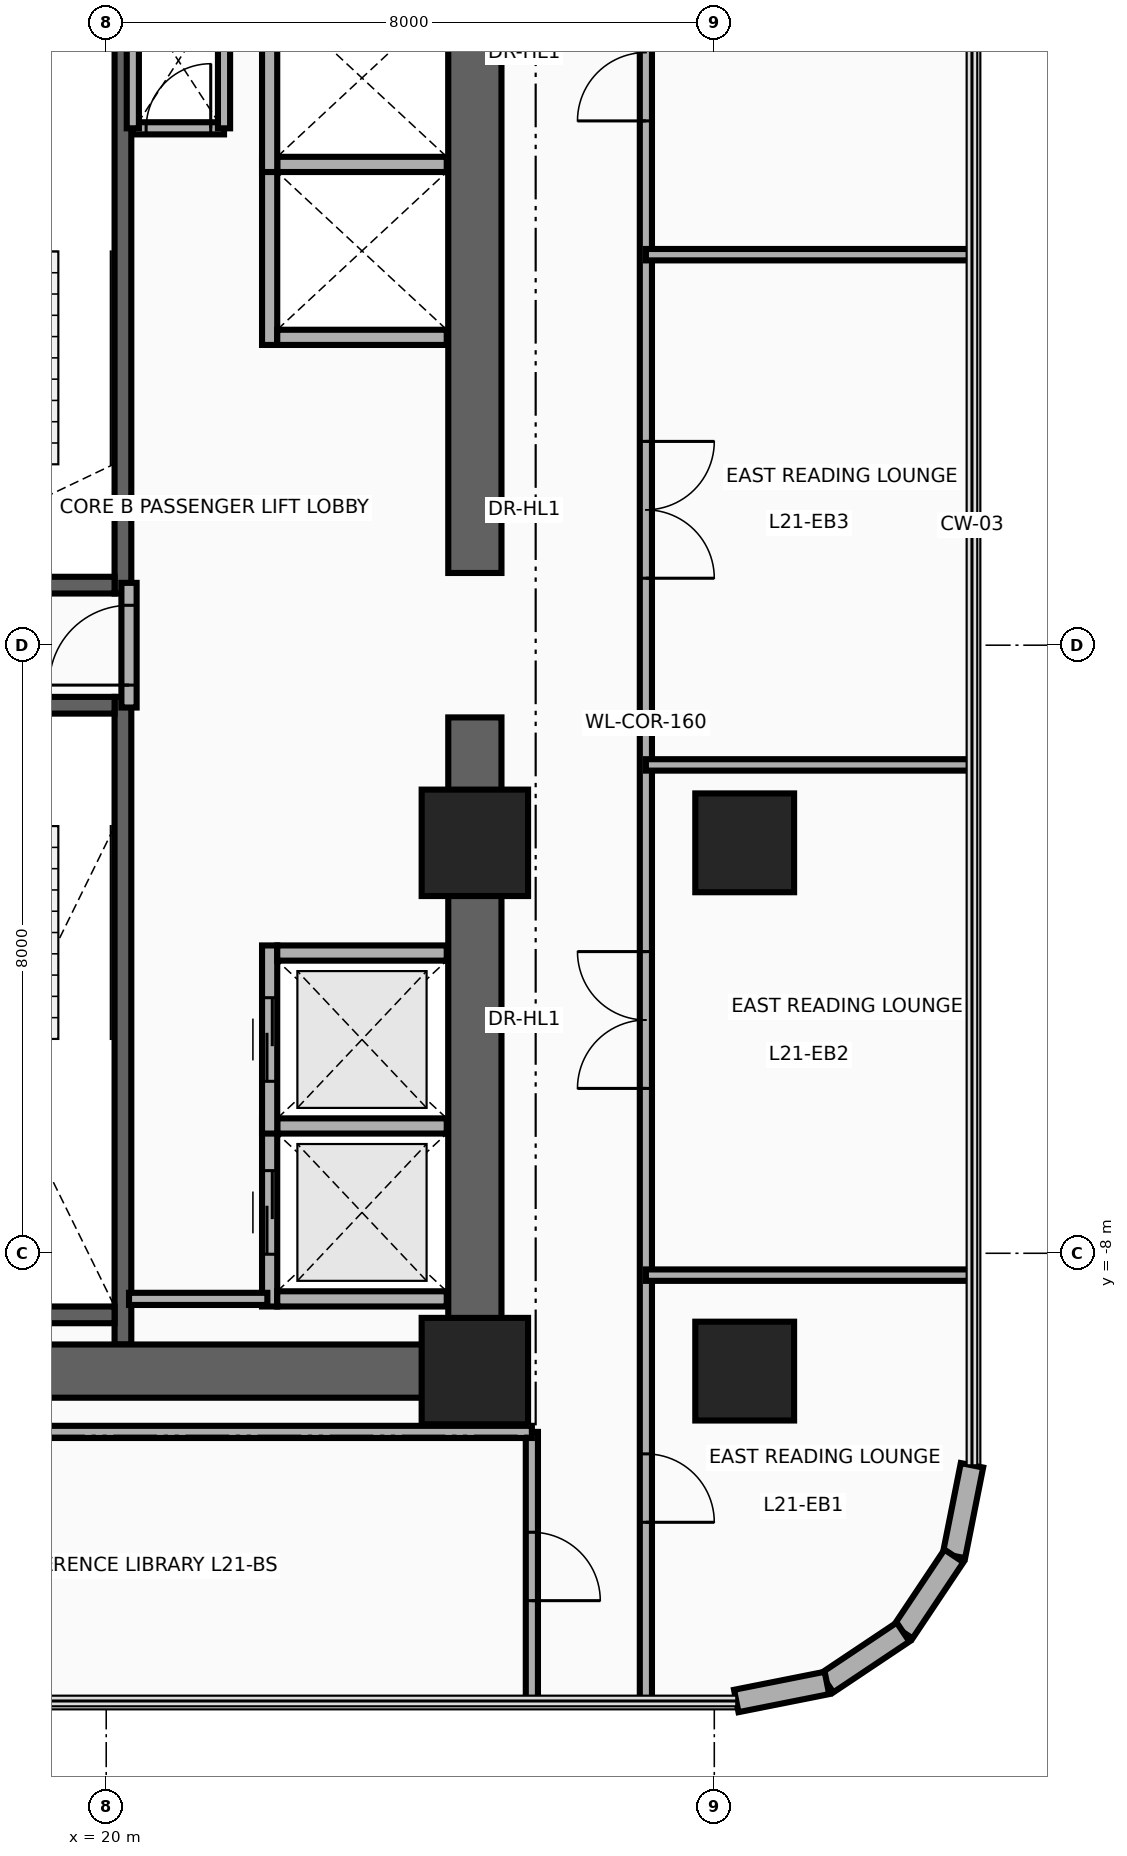
"""IFC4 building model, lengths in metres.
Left out: names, types, materials, properties, quantities, classifications, styles, units other than length and angle.
Written with IfcOpenShell. Run it as: python <this file> out.ifc"""

import sys

from ifc_helpers import new_model, si_unit, direction, frame, frame_2d, origin, origin_2d, place, context, subcontext, project, spatial, rectangle, circle, extrude, source, transform, mapped, element, fill, save


model = new_model("IFC4")
c1 = context("Model", 3, precision=1e-05, world=origin(), true_north=direction((0.0, 1.0)))
c2 = subcontext(c1, "Body", "Model", "MODEL_VIEW")
j1 = project(units=[si_unit("LENGTHUNIT", "METRE"), si_unit("PLANEANGLEUNIT", "RADIAN")], contexts=[c1])
p1 = place(None, origin())
s1 = spatial("IfcSite", under=j1, at=p1, CompositionType="ELEMENT")
p2 = place(p1, origin())
s2 = spatial("IfcBuilding", under=s1, at=p2, CompositionType="ELEMENT")
p3 = place(p2, frame((0.0, 0.0, 85.2)))
s3 = spatial("IfcBuildingStorey", under=s2, at=p3, CompositionType="ELEMENT", Elevation=85.2)
p4 = place(p3, frame((20.22, 0.68, 0.0), z_axis=(0.0, 0.0, 1.0), x_axis=(0.0, 1.0, 0.0)))
e1 = element("IfcWall", 1, at=p4, inside=s3, PredefinedType="SHEAR", context=c2, shape_type="SweptSolid", body=[
    extrude(rectangle(XDim=8.52, YDim=0.22, at=frame_2d((4.26, 0.0))), origin(), (0.0, 0.0, 1.0), 3.46),
])
p5 = place(p3, frame((17.0, 0.79, 0.0), z_axis=(0.0, 0.0, 1.0), x_axis=(1.0, 0.0, 0.0)))
e2 = element("IfcWall", 2, at=p5, inside=s3, PredefinedType="SHEAR", context=c2, shape_type="SweptSolid", body=[
    extrude(rectangle(XDim=3.11, YDim=0.22, at=frame_2d((1.555, 0.0))), origin(), (0.0, 0.0, 1.0), 3.46),
])
p6 = place(p5, frame((0.95, 0.0, 0.0)))
e3 = element("IfcOpeningElement", 3, at=p6, cuts=e2, PredefinedType="OPENING", context=c2, shape_type="SweptSolid", body=[
    extrude(rectangle(XDim=1.1, YDim=2.15, at=frame_2d((0.55, 1.075))), frame((0.0, 0.125, 0.0), z_axis=(0.0, -1.0, 0.0), x_axis=(1.0, 0.0, 0.0)), (0.0, 0.0, 1.0), 0.25),
])
p7 = place(p3, frame((20.22, -9.2, 0.0), z_axis=(0.0, 0.0, 1.0), x_axis=(0.0, 1.0, 0.0)))
e4 = element("IfcWall", 4, at=p7, inside=s3, PredefinedType="SHEAR", context=c2, shape_type="SweptSolid", body=[
    extrude(rectangle(XDim=8.52, YDim=0.22, at=frame_2d((4.26, 0.0))), origin(), (0.0, 0.0, 1.0), 3.46),
])
p8 = place(p3, frame((17.0, -8.81, 0.0), z_axis=(0.0, 0.0, 1.0), x_axis=(1.0, 0.0, 0.0)))
e5 = element("IfcWall", 5, at=p8, inside=s3, PredefinedType="SHEAR", context=c2, shape_type="SweptSolid", body=[
    extrude(rectangle(XDim=3.11, YDim=0.22, at=frame_2d((1.555, 0.0))), origin(), (0.0, 0.0, 1.0), 3.46),
])
p9 = place(p3, frame((17.0, -0.79, 0.0), z_axis=(0.0, 0.0, 1.0), x_axis=(1.0, 0.0, 0.0)))
e6 = element("IfcWall", 6, at=p9, inside=s3, PredefinedType="SHEAR", context=c2, shape_type="SweptSolid", body=[
    extrude(rectangle(XDim=3.11, YDim=0.22, at=frame_2d((1.555, 0.0))), origin(), (0.0, 0.0, 1.0), 3.46),
])
p10 = place(p9, frame((0.95, 0.0, 0.0)))
e7 = element("IfcOpeningElement", 7, at=p10, cuts=e6, PredefinedType="OPENING", context=c2, shape_type="SweptSolid", body=[
    extrude(rectangle(XDim=1.1, YDim=2.15, at=frame_2d((0.55, 1.075))), frame((0.0, 0.125, 0.0), z_axis=(0.0, -1.0, 0.0), x_axis=(1.0, 0.0, 0.0)), (0.0, 0.0, 1.0), 0.25),
])
for number, where, z_axis, x_axis in (
    (8, (24.85, -9.9, 0.0), (0.0, 0.0, 1.0), (0.0, 1.0, 0.0)),
    (9, (24.85, 0.95, 0.0), (0.0, 0.0, 1.0), (0.0, 1.0, 0.0)),
):
    element("IfcWall", number, at=place(p3, frame(where, z_axis=z_axis, x_axis=x_axis)), inside=s3, PredefinedType="SHEAR", context=c2, shape_type="SweptSolid", body=[
        extrude(rectangle(XDim=8.95, YDim=0.7, at=frame_2d((4.475, 0.0))), origin(), (0.0, 0.0, 1.0), 3.46),
    ])
p11 = place(p3, frame((15.85, -9.55, 0.0), z_axis=(0.0, 0.0, 1.0), x_axis=(1.0, 0.0, 0.0)))
e10 = element("IfcWall", 10, at=p11, inside=s3, PredefinedType="SHEAR", context=c2, shape_type="SweptSolid", body=[
    extrude(rectangle(XDim=9.0, YDim=0.7, at=frame_2d((4.5, 0.0))), origin(), (0.0, 0.0, 1.0), 3.46),
])
m1 = source(origin(), c2, "Body", "SweptSolid", [
    extrude(rectangle(XDim=1.4, YDim=1.4, at=origin_2d()), origin(), (0.0, 0.0, 1.0), 3.7),
])
p12 = place(p3, frame((24.85, -9.55, 0.0), z_axis=(0.0, 0.0, 1.0), x_axis=(1.0, 0.0, 0.0)))
e11 = element("IfcColumn", 11, at=p12, inside=s3, PredefinedType="COLUMN", context=c2, shape_type="MappedRepresentation", body=[
    mapped(m1, transform((0.0, 0.0, 0.0), x_axis=(1.0, 0.0, 0.0), y_axis=(0.0, 1.0, 0.0), z_axis=(0.0, 0.0, 1.0), scale=1.0)),
])
m2 = source(origin(), c2, "Body", "SweptSolid", [
    extrude(circle(Radius=0.65, at=origin_2d()), origin(), (0.0, 0.0, 1.0), 3.7),
])
p13 = place(p3, frame((28.4, -9.55, 0.0), z_axis=(0.0, 0.0, 1.0), x_axis=(1.0, 0.0, 0.0)))
e12 = element("IfcColumn", 12, at=p13, inside=s3, PredefinedType="COLUMN", context=c2, shape_type="MappedRepresentation", body=[
    mapped(m2, transform((0.0, 0.0, 0.0), x_axis=(1.0, 0.0, 0.0), y_axis=(0.0, 1.0, 0.0), z_axis=(0.0, 0.0, 1.0), scale=1.0)),
])
p14 = place(p3, frame((24.85, -2.6, 0.0), z_axis=(0.0, 0.0, 1.0), x_axis=(1.0, 0.0, 0.0)))
e13 = element("IfcColumn", 13, at=p14, inside=s3, PredefinedType="COLUMN", context=c2, shape_type="MappedRepresentation", body=[
    mapped(m1, transform((0.0, 0.0, 0.0), x_axis=(1.0, 0.0, 0.0), y_axis=(0.0, 1.0, 0.0), z_axis=(0.0, 0.0, 1.0), scale=1.0)),
])
p15 = place(p3, frame((28.4, -2.6, 0.0), z_axis=(0.0, 0.0, 1.0), x_axis=(1.0, 0.0, 0.0)))
e14 = element("IfcColumn", 14, at=p15, inside=s3, PredefinedType="COLUMN", context=c2, shape_type="MappedRepresentation", body=[
    mapped(m2, transform((0.0, 0.0, 0.0), x_axis=(1.0, 0.0, 0.0), y_axis=(0.0, 1.0, 0.0), z_axis=(0.0, 0.0, 1.0), scale=1.0)),
])
p16 = place(p3, frame((31.39, -10.789, 0.0), z_axis=(0.0, 0.0, 1.0), x_axis=(-0.194996050505, -0.980804027463, 0.0)))
e15 = element("IfcWall", 15, at=p16, inside=s3, PredefinedType="SOLIDWALL", context=c2, shape_type="SweptSolid", body=[
    extrude(rectangle(XDim=1.216, YDim=0.3, at=frame_2d((0.608, 0.0))), origin(), (0.0, 0.0, 1.0), 3.46),
])
for number, where, z_axis, x_axis in (
    (16, (31.153, -11.982, 0.0), (0.0, 0.0, 1.0), (-0.556, -0.831, 0.0)),
    (17, (30.483, -12.983, 0.0), (0.0, 0.0, 1.0), (-0.831, -0.556, 0.0)),
):
    element("IfcWall", number, at=place(p3, frame(where, z_axis=z_axis, x_axis=x_axis)), inside=s3, PredefinedType="SOLIDWALL", context=c2, shape_type="SweptSolid", body=[
        extrude(rectangle(XDim=1.205, YDim=0.3, at=frame_2d((0.603, 0.0))), origin(), (0.0, 0.0, 1.0), 3.46),
    ])
p17 = place(p3, frame((29.482, -13.653, 0.0), z_axis=(0.0, 0.0, 1.0), x_axis=(-0.980804027463, -0.194996050505, 0.0)))
e18 = element("IfcWall", 18, at=p17, inside=s3, PredefinedType="SOLIDWALL", context=c2, shape_type="SweptSolid", body=[
    extrude(rectangle(XDim=1.216, YDim=0.3, at=frame_2d((0.608, 0.0))), origin(), (0.0, 0.0, 1.0), 3.46),
])
p18 = place(p3, frame((22.15, -8.7, 0.0), z_axis=(0.0, 0.0, 1.0), x_axis=(0.0, 1.0, 0.0)))
e19 = element("IfcWall", 19, at=p18, inside=s3, PredefinedType="MOVABLE", context=c2, shape_type="SweptSolid", body=[
    extrude(rectangle(XDim=2.475, YDim=0.2, at=frame_2d((1.237, 0.0))), origin(), (0.0, 0.0, 1.0), 3.46),
])
p19 = place(p18, frame((0.688, 0.0, 0.0)))
e20 = element("IfcOpeningElement", 20, at=p19, cuts=e19, PredefinedType="OPENING", context=c2, shape_type="SweptSolid", body=[
    extrude(rectangle(XDim=1.1, YDim=2.1, at=frame_2d((0.55, 1.05))), frame((0.0, 0.115, 0.0), z_axis=(0.0, -1.0, 0.0), x_axis=(1.0, 0.0, 0.0)), (0.0, 0.0, 1.0), 0.23),
])
for number, where, z_axis, x_axis in (
    (21, (22.25, -8.6, 0.0), (0.0, 0.0, 1.0), (1.0, 0.0, 0.0)),
    (22, (22.25, -6.325, 0.0), (0.0, 0.0, 1.0), (1.0, 0.0, 0.0)),
):
    element("IfcWall", number, at=place(p3, frame(where, z_axis=z_axis, x_axis=x_axis)), inside=s3, PredefinedType="MOVABLE", context=c2, shape_type="SweptSolid", body=[
        extrude(rectangle(XDim=2.23, YDim=0.2, at=frame_2d((1.115, 0.0))), origin(), (0.0, 0.0, 1.0), 3.46),
    ])
p20 = place(p3, frame((22.15, -6.425, 0.0), z_axis=(0.0, 0.0, 1.0), x_axis=(0.0, 1.0, 0.0)))
e23 = element("IfcWall", 23, at=p20, inside=s3, PredefinedType="MOVABLE", context=c2, shape_type="SweptSolid", body=[
    extrude(rectangle(XDim=2.475, YDim=0.2, at=frame_2d((1.238, 0.0))), origin(), (0.0, 0.0, 1.0), 3.46),
])
p21 = place(p20, frame((0.688, 0.0, 0.0)))
e24 = element("IfcOpeningElement", 24, at=p21, cuts=e23, PredefinedType="OPENING", context=c2, shape_type="SweptSolid", body=[
    extrude(rectangle(XDim=1.1, YDim=2.1, at=frame_2d((0.55, 1.05))), frame((0.0, 0.115, 0.0), z_axis=(0.0, -1.0, 0.0), x_axis=(1.0, 0.0, 0.0)), (0.0, 0.0, 1.0), 0.23),
])
p22 = place(p3, frame((22.25, -4.05, 0.0), z_axis=(0.0, 0.0, 1.0), x_axis=(1.0, 0.0, 0.0)))
e25 = element("IfcWall", 25, at=p22, inside=s3, PredefinedType="MOVABLE", context=c2, shape_type="SweptSolid", body=[
    extrude(rectangle(XDim=2.23, YDim=0.2, at=frame_2d((1.115, 0.0))), origin(), (0.0, 0.0, 1.0), 3.46),
])
p23 = place(p3, frame((22.15, 3.95, 0.0), z_axis=(0.0, 0.0, 1.0), x_axis=(0.0, 1.0, 0.0)))
e26 = element("IfcWall", 26, at=p23, inside=s3, PredefinedType="MOVABLE", context=c2, shape_type="SweptSolid", body=[
    extrude(rectangle(XDim=2.475, YDim=0.2, at=frame_2d((1.238, 0.0))), origin(), (0.0, 0.0, 1.0), 3.46),
])
for number, where, z_axis, x_axis in (
    (27, (22.25, 4.05, 0.0), (0.0, 0.0, 1.0), (1.0, 0.0, 0.0)),
    (28, (22.25, 6.325, 0.0), (0.0, 0.0, 1.0), (1.0, 0.0, 0.0)),
):
    element("IfcWall", number, at=place(p3, frame(where, z_axis=z_axis, x_axis=x_axis)), inside=s3, PredefinedType="MOVABLE", context=c2, shape_type="SweptSolid", body=[
        extrude(rectangle(XDim=2.23, YDim=0.2, at=frame_2d((1.115, 0.0))), origin(), (0.0, 0.0, 1.0), 2.245),
    ])
p24 = place(p3, frame((22.15, 6.225, 0.0), z_axis=(0.0, 0.0, 1.0), x_axis=(0.0, 1.0, 0.0)))
e29 = element("IfcWall", 29, at=p24, inside=s3, PredefinedType="MOVABLE", context=c2, shape_type="SweptSolid", body=[
    extrude(rectangle(XDim=2.475, YDim=0.2, at=frame_2d((1.237, 0.0))), origin(), (0.0, 0.0, 1.0), 3.46),
])
p25 = place(p3, frame((20.3, -0.82, 0.0), z_axis=(0.0, 0.0, 1.0), x_axis=(0.0, 1.0, 0.0)))
e30 = element("IfcWall", 30, at=p25, inside=s3, PredefinedType="PARTITIONING", context=c2, shape_type="SweptSolid", body=[
    extrude(rectangle(XDim=1.64, YDim=0.2, at=frame_2d((0.82, 0.0))), origin(), (0.0, 0.0, 1.0), 3.46),
])
p26 = place(p25, frame((0.295, 0.0, 0.0)))
e31 = element("IfcOpeningElement", 31, at=p26, cuts=e30, PredefinedType="OPENING", context=c2, shape_type="SweptSolid", body=[
    extrude(rectangle(XDim=1.05, YDim=2.15, at=frame_2d((0.525, 1.075))), frame((0.0, 0.115, 0.0), z_axis=(0.0, -1.0, 0.0), x_axis=(1.0, 0.0, 0.0)), (0.0, 0.0, 1.0), 0.23),
])
p27 = place(p3, frame((20.35, 6.8, 0.0), z_axis=(0.0, 0.0, 1.0), x_axis=(1.0, 0.0, 0.0)))
e32 = element("IfcWall", 32, at=p27, inside=s3, PredefinedType="PARTITIONING", context=c2, shape_type="SweptSolid", body=[
    extrude(rectangle(XDim=1.2, YDim=0.16, at=frame_2d((0.6, 0.0))), origin(), (0.0, 0.0, 1.0), 3.46),
])
p28 = place(p27, frame((0.175, 0.0, 0.0)))
e33 = element("IfcOpeningElement", 33, at=p28, cuts=e32, PredefinedType="OPENING", context=c2, shape_type="SweptSolid", body=[
    extrude(rectangle(XDim=0.85, YDim=2.05, at=frame_2d((0.425, 1.025))), frame((0.0, 0.095, 0.0), z_axis=(0.0, -1.0, 0.0), x_axis=(1.0, 0.0, 0.0)), (0.0, 0.0, 1.0), 0.19),
])
for number, where, z_axis, x_axis in (
    (34, (21.55, 6.8, 0.0), (0.0, 0.0, 1.0), (0.0, 1.0, 0.0)),
    (35, (20.35, 6.8, 0.0), (0.0, 0.0, 1.0), (0.0, 1.0, 0.0)),
):
    element("IfcWall", number, at=place(p3, frame(where, z_axis=z_axis, x_axis=x_axis)), inside=s3, PredefinedType="PARTITIONING", context=c2, shape_type="SweptSolid", body=[
        extrude(rectangle(XDim=1.8, YDim=0.16, at=frame_2d((0.9, 0.0))), origin(), (0.0, 0.0, 1.0), 3.46),
    ])
p29 = place(p3, frame((20.3, -8.6, 0.0), z_axis=(0.0, 0.0, 1.0), x_axis=(1.0, 0.0, 0.0)))
e36 = element("IfcWall", 36, at=p29, inside=s3, PredefinedType="PARTITIONING", context=c2, shape_type="SweptSolid", body=[
    extrude(rectangle(XDim=1.82, YDim=0.16, at=frame_2d((0.91, 0.0))), origin(), (0.0, 0.0, 1.0), 3.46),
])
p30 = place(p3, frame((25.6, -13.89, 0.0), z_axis=(0.0, 0.0, 1.0), x_axis=(0.0, 1.0, 0.0)))
e37 = element("IfcWall", 37, at=p30, inside=s3, PredefinedType="PARTITIONING", context=c2, shape_type="SweptSolid", body=[
    extrude(rectangle(XDim=3.54, YDim=0.16, at=frame_2d((1.77, 0.0))), origin(), (0.0, 0.0, 1.0), 3.46),
])
p31 = place(p30, frame((1.32, 0.0, 0.0)))
e38 = element("IfcOpeningElement", 38, at=p31, cuts=e37, PredefinedType="OPENING", context=c2, shape_type="SweptSolid", body=[
    extrude(rectangle(XDim=0.9, YDim=2.1, at=frame_2d((0.45, 1.05))), frame((0.0, 0.095, 0.0), z_axis=(0.0, -1.0, 0.0), x_axis=(1.0, 0.0, 0.0)), (0.0, 0.0, 1.0), 0.19),
])
p32 = place(p3, frame((13.41, -10.35, 0.0), z_axis=(0.0, 0.0, 1.0), x_axis=(1.0, 0.0, 0.0)))
e39 = element("IfcWall", 39, at=p32, inside=s3, PredefinedType="PARTITIONING", context=c2, shape_type="SweptSolid", body=[
    extrude(rectangle(XDim=12.19, YDim=0.16, at=frame_2d((6.095, 0.0))), origin(), (0.0, 0.0, 1.0), 3.46),
])
p33 = place(p3, frame((27.1, -13.89, 0.0), z_axis=(0.0, 0.0, 1.0), x_axis=(0.0, 1.0, 0.0)))
e40 = element("IfcWall", 40, at=p33, inside=s3, PredefinedType="PARTITIONING", context=c2, shape_type="SweptSolid", body=[
    extrude(rectangle(XDim=25.74, YDim=0.16, at=frame_2d((12.87, 0.0))), origin(), (0.0, 0.0, 1.0), 2.583),
])
p34 = place(p33, frame((2.351, 0.0, 0.0)))
e41 = element("IfcOpeningElement", 41, at=p34, cuts=e40, PredefinedType="OPENING", context=c2, shape_type="SweptSolid", body=[
    extrude(rectangle(XDim=0.9, YDim=2.1, at=frame_2d((0.45, 1.05))), frame((0.0, 0.095, 0.0), z_axis=(0.0, -1.0, 0.0), x_axis=(1.0, 0.0, 0.0)), (0.0, 0.0, 1.0), 0.19),
])
p35 = place(p33, frame((8.059, 0.0, 0.0)))
e42 = element("IfcOpeningElement", 42, at=p35, cuts=e40, PredefinedType="OPENING", context=c2, shape_type="SweptSolid", body=[
    extrude(rectangle(XDim=1.8, YDim=2.15, at=frame_2d((0.9, 1.075))), frame((0.0, 0.095, 0.0), z_axis=(0.0, -1.0, 0.0), x_axis=(1.0, 0.0, 0.0)), (0.0, 0.0, 1.0), 0.19),
])
p36 = place(p33, frame((14.771, 0.0, 0.0)))
e43 = element("IfcOpeningElement", 43, at=p36, cuts=e40, PredefinedType="OPENING", context=c2, shape_type="SweptSolid", body=[
    extrude(rectangle(XDim=1.8, YDim=2.15, at=frame_2d((0.9, 1.075))), frame((0.0, 0.095, 0.0), z_axis=(0.0, -1.0, 0.0), x_axis=(1.0, 0.0, 0.0)), (0.0, 0.0, 1.0), 0.19),
])
p37 = place(p33, frame((20.788, 0.0, 0.0)))
e44 = element("IfcOpeningElement", 44, at=p37, cuts=e40, PredefinedType="OPENING", context=c2, shape_type="SweptSolid", body=[
    extrude(rectangle(XDim=1.8, YDim=2.15, at=frame_2d((0.9, 1.075))), frame((0.0, 0.095, 0.0), z_axis=(0.0, -1.0, 0.0), x_axis=(1.0, 0.0, 0.0)), (0.0, 0.0, 1.0), 0.19),
])
for number, where, z_axis, x_axis in (
    (45, (27.1, -8.288, 0.0), (0.0, 0.0, 1.0), (1.0, 0.0, 0.0)),
    (46, (27.1, -1.575, 0.0), (0.0, 0.0, 1.0), (1.0, 0.0, 0.0)),
    (47, (27.1, 5.137, 0.0), (0.0, 0.0, 1.0), (1.0, 0.0, 0.0)),
):
    element("IfcWall", number, at=place(p3, frame(where, z_axis=z_axis, x_axis=x_axis)), inside=s3, PredefinedType="PARTITIONING", context=c2, shape_type="SweptSolid", body=[
        extrude(rectangle(XDim=4.29, YDim=0.15, at=frame_2d((2.145, 0.0))), origin(), (0.0, 0.0, 1.0), 2.896),
    ])
p38 = place(p19, origin())
e48 = element("IfcDoor", 48, at=p38, inside=s3, OperationType="DOUBLE_DOOR_SLIDING", PredefinedType="DOOR", context=c2, shape_type="SweptSolid", body=[
    extrude(rectangle(XDim=1.1, YDim=2.1, at=frame_2d((0.55, 1.05))), frame((0.0, 0.025, 0.0), z_axis=(0.0, -1.0, 0.0), x_axis=(1.0, 0.0, 0.0)), (0.0, 0.0, 1.0), 0.05),
])
fill(e20, e48)
p39 = place(p21, origin())
e49 = element("IfcDoor", 49, at=p39, inside=s3, OperationType="DOUBLE_DOOR_SLIDING", PredefinedType="DOOR", context=c2, shape_type="SweptSolid", body=[
    extrude(rectangle(XDim=1.1, YDim=2.1, at=frame_2d((0.55, 1.05))), frame((0.0, 0.025, 0.0), z_axis=(0.0, -1.0, 0.0), x_axis=(1.0, 0.0, 0.0)), (0.0, 0.0, 1.0), 0.05),
])
fill(e24, e49)
p40 = place(p26, origin())
e50 = element("IfcDoor", 50, at=p40, inside=s3, OperationType="SINGLE_SWING_RIGHT", PredefinedType="DOOR", context=c2, shape_type="SweptSolid", body=[
    extrude(rectangle(XDim=1.05, YDim=2.15, at=frame_2d((0.525, 1.075))), frame((0.0, 0.025, 0.0), z_axis=(0.0, -1.0, 0.0), x_axis=(1.0, 0.0, 0.0)), (0.0, 0.0, 1.0), 0.05),
])
fill(e31, e50)
p41 = place(p28, origin())
e51 = element("IfcDoor", 51, at=p41, inside=s3, OperationType="SINGLE_SWING_LEFT", PredefinedType="DOOR", context=c2, shape_type="SweptSolid", body=[
    extrude(rectangle(XDim=0.85, YDim=2.05, at=frame_2d((0.425, 1.025))), frame((0.0, 0.025, 0.0), z_axis=(0.0, -1.0, 0.0), x_axis=(1.0, 0.0, 0.0)), (0.0, 0.0, 1.0), 0.05),
])
fill(e33, e51)
p42 = place(p31, frame((0.9, 0.0, 0.0), z_axis=(0.0, 0.0, 1.0), x_axis=(-1.0, 0.0, 0.0)))
e52 = element("IfcDoor", 52, at=p42, inside=s3, OperationType="SINGLE_SWING_LEFT", PredefinedType="DOOR", context=c2, shape_type="SweptSolid", body=[
    extrude(rectangle(XDim=0.9, YDim=2.1, at=frame_2d((0.45, 1.05))), frame((0.0, 0.025, 0.0), z_axis=(0.0, -1.0, 0.0), x_axis=(1.0, 0.0, 0.0)), (0.0, 0.0, 1.0), 0.05),
])
fill(e38, e52)
p43 = place(p34, frame((0.9, 0.0, 0.0), z_axis=(0.0, 0.0, 1.0), x_axis=(-1.0, 0.0, 0.0)))
e53 = element("IfcDoor", 53, at=p43, inside=s3, OperationType="SINGLE_SWING_LEFT", PredefinedType="DOOR", context=c2, shape_type="SweptSolid", body=[
    extrude(rectangle(XDim=0.9, YDim=2.1, at=frame_2d((0.45, 1.05))), frame((0.0, 0.025, 0.0), z_axis=(0.0, -1.0, 0.0), x_axis=(1.0, 0.0, 0.0)), (0.0, 0.0, 1.0), 0.05),
])
fill(e41, e53)
p44 = place(p35, origin())
e54 = element("IfcDoor", 54, at=p44, inside=s3, OperationType="DOUBLE_DOOR_SINGLE_SWING", PredefinedType="DOOR", context=c2, shape_type="SweptSolid", body=[
    extrude(rectangle(XDim=1.8, YDim=2.15, at=frame_2d((0.9, 1.075))), frame((0.0, 0.025, 0.0), z_axis=(0.0, -1.0, 0.0), x_axis=(1.0, 0.0, 0.0)), (0.0, 0.0, 1.0), 0.05),
])
fill(e42, e54)
p45 = place(p36, frame((1.8, 0.0, 0.0), z_axis=(0.0, 0.0, 1.0), x_axis=(-1.0, 0.0, 0.0)))
e55 = element("IfcDoor", 55, at=p45, inside=s3, OperationType="DOUBLE_DOOR_SINGLE_SWING", PredefinedType="DOOR", context=c2, shape_type="SweptSolid", body=[
    extrude(rectangle(XDim=1.8, YDim=2.15, at=frame_2d((0.9, 1.075))), frame((0.0, 0.025, 0.0), z_axis=(0.0, -1.0, 0.0), x_axis=(1.0, 0.0, 0.0)), (0.0, 0.0, 1.0), 0.05),
])
fill(e43, e55)
p46 = place(p37, origin())
e56 = element("IfcDoor", 56, at=p46, inside=s3, OperationType="DOUBLE_DOOR_SINGLE_SWING", PredefinedType="DOOR", context=c2, shape_type="SweptSolid", body=[
    extrude(rectangle(XDim=1.8, YDim=2.15, at=frame_2d((0.9, 1.075))), frame((0.0, 0.025, 0.0), z_axis=(0.0, -1.0, 0.0), x_axis=(1.0, 0.0, 0.0)), (0.0, 0.0, 1.0), 0.05),
])
fill(e44, e56)
save(model, sys.argv[1])
